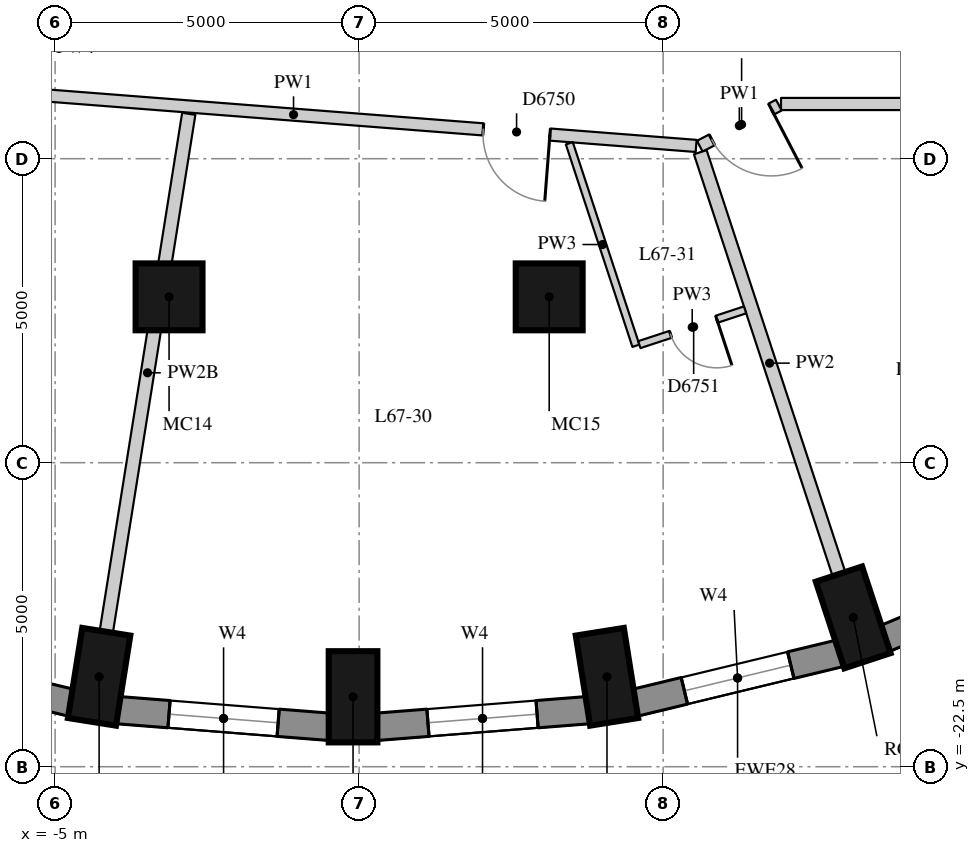
"""IFC4 building model, lengths in metres.
Left out: names, types, materials, properties, quantities, classifications, styles, units other than length and angle.
Written with IfcOpenShell. Run it as: python <this file> out.ifc"""

import sys

from ifc_helpers import new_model, si_unit, direction, frame, frame_2d, origin, origin_2d, place, context, subcontext, project, spatial, rectangle, extrude, element, fill, save


model = new_model("IFC4")
c1 = context("Model", 3, precision=1e-05, world=origin(), true_north=direction((0.0, 1.0)))
c2 = subcontext(c1, "Body", "Model", "MODEL_VIEW")
j1 = project(units=[si_unit("LENGTHUNIT", "METRE"), si_unit("PLANEANGLEUNIT", "RADIAN")], contexts=[c1])
p1 = place(None, origin())
s1 = spatial("IfcSite", under=j1, at=p1, CompositionType="ELEMENT")
p2 = place(p1, origin())
s2 = spatial("IfcBuilding", under=s1, at=p2, CompositionType="ELEMENT")
p3 = place(p2, frame((0.0, 0.0, 236.6)))
s3 = spatial("IfcBuildingStorey", under=s2, at=p3, CompositionType="ELEMENT", Elevation=236.6)
for number, where, z_axis, x_axis in (
    (1, (-4.276, -21.021, 0.0), (0.0, 0.0, 1.0), (-0.157, -0.988, 0.0)),
    (2, (-0.1, -21.35, 0.0), (0.0, 0.0, 1.0), (0.0, -1.0, 0.0)),
    (3, (4.076, -21.021, 0.0), (0.0, 0.0, 1.0), (0.157, -0.988, 0.0)),
    (4, (8.125, -20.044, 0.0), (0.0, 0.0, 1.0), (0.312, -0.95, 0.0)),
):
    element("IfcColumn", number, at=place(p3, frame(where, z_axis=z_axis, x_axis=x_axis)), inside=s3, PredefinedType="COLUMN", context=c2, shape_type="SweptSolid", body=[
        extrude(rectangle(XDim=1.5, YDim=0.8, at=origin_2d()), origin(), (0.0, 0.0, 1.0), 3.3),
    ])
for number, where, z_axis, x_axis in (
    (5, (-3.126, -14.772, 0.0), (0.0, 0.0, 1.0), (1.0, 0.0, 0.0)),
    (6, (3.126, -14.772, 0.0), (0.0, 0.0, 1.0), (1.0, 0.0, 0.0)),
):
    element("IfcColumn", number, at=place(p3, frame(where, z_axis=z_axis, x_axis=x_axis)), inside=s3, PredefinedType="COLUMN", context=c2, shape_type="SweptSolid", body=[
        extrude(rectangle(XDim=1.1, YDim=1.1, at=origin_2d()), origin(), (0.0, 0.0, 1.0), 3.3),
    ])
p4 = place(p3, frame((-8.119, -20.632, 0.0), z_axis=(0.0, 0.0, 1.0), x_axis=(0.972115243017, -0.234503633859, 0.0)))
e7 = element("IfcWall", 7, at=p4, inside=s3, PredefinedType="SOLIDWALL", context=c2, shape_type="SweptSolid", body=[
    extrude(rectangle(XDim=3.487, YDim=0.45, at=frame_2d((1.743, 0.0))), origin(), (0.0, 0.0, 1.0), 3.02),
])
p5 = place(p4, frame((0.843, 0.0, 0.4)))
e8 = element("IfcOpeningElement", 8, at=p5, cuts=e7, PredefinedType="OPENING", context=c2, shape_type="SweptSolid", body=[
    extrude(rectangle(XDim=1.8, YDim=1.75, at=frame_2d((0.9, 0.875))), frame((0.0, 0.235, 0.0), z_axis=(0.0, -1.0, 0.0), x_axis=(1.0, 0.0, 0.0)), (0.0, 0.0, 1.0), 0.47),
])
p6 = place(p3, frame((-3.979, -21.569, 0.0), z_axis=(0.0, 0.0, 1.0), x_axis=(0.996910775835, -0.078542377245, 0.0)))
e9 = element("IfcWall", 9, at=p6, inside=s3, PredefinedType="SOLIDWALL", context=c2, shape_type="SweptSolid", body=[
    extrude(rectangle(XDim=3.509, YDim=0.45, at=frame_2d((1.755, 0.0))), origin(), (0.0, 0.0, 1.0), 3.02),
])
p7 = place(p6, frame((0.855, 0.0, 0.4)))
e10 = element("IfcOpeningElement", 10, at=p7, cuts=e9, PredefinedType="OPENING", context=c2, shape_type="SweptSolid", body=[
    extrude(rectangle(XDim=1.8, YDim=1.75, at=frame_2d((0.9, 0.875))), frame((0.0, 0.235, 0.0), z_axis=(0.0, -1.0, 0.0), x_axis=(1.0, 0.0, 0.0)), (0.0, 0.0, 1.0), 0.47),
])
p8 = place(p3, frame((0.28, -21.844, 0.0), z_axis=(0.0, 0.0, 1.0), x_axis=(0.996910775835, 0.078542377245, 0.0)))
e11 = element("IfcWall", 11, at=p8, inside=s3, PredefinedType="SOLIDWALL", context=c2, shape_type="SweptSolid", body=[
    extrude(rectangle(XDim=3.509, YDim=0.45, at=frame_2d((1.755, 0.0))), origin(), (0.0, 0.0, 1.0), 3.02),
])
p9 = place(p8, frame((0.855, 0.0, 0.4)))
e12 = element("IfcOpeningElement", 12, at=p9, cuts=e11, PredefinedType="OPENING", context=c2, shape_type="SweptSolid", body=[
    extrude(rectangle(XDim=1.8, YDim=1.75, at=frame_2d((0.9, 0.875))), frame((0.0, 0.235, 0.0), z_axis=(0.0, -1.0, 0.0), x_axis=(1.0, 0.0, 0.0)), (0.0, 0.0, 1.0), 0.47),
])
p10 = place(p3, frame((4.529, -21.449, 0.0), z_axis=(0.0, 0.0, 1.0), x_axis=(0.972115243017, 0.234503633859, 0.0)))
e13 = element("IfcWall", 13, at=p10, inside=s3, PredefinedType="SOLIDWALL", context=c2, shape_type="SweptSolid", body=[
    extrude(rectangle(XDim=3.487, YDim=0.45, at=frame_2d((1.743, 0.0))), origin(), (0.0, 0.0, 1.0), 3.02),
])
p11 = place(p10, frame((0.843, 0.0, 0.4)))
e14 = element("IfcOpeningElement", 14, at=p11, cuts=e13, PredefinedType="OPENING", context=c2, shape_type="SweptSolid", body=[
    extrude(rectangle(XDim=1.8, YDim=1.75, at=frame_2d((0.9, 0.875))), frame((0.0, 0.235, 0.0), z_axis=(0.0, -1.0, 0.0), x_axis=(1.0, 0.0, 0.0)), (0.0, 0.0, 1.0), 0.47),
])
p12 = place(p3, frame((8.641, -20.395, 0.0), z_axis=(0.0, 0.0, 1.0), x_axis=(0.922049934692, 0.3870709469, 0.0)))
e15 = element("IfcWall", 15, at=p12, inside=s3, PredefinedType="SOLIDWALL", context=c2, shape_type="SweptSolid", body=[
    extrude(rectangle(XDim=3.443, YDim=0.45, at=frame_2d((1.722, 0.0))), origin(), (0.0, 0.0, 1.0), 3.02),
])
p13 = place(p12, frame((0.822, 0.0, 0.4)))
e16 = element("IfcOpeningElement", 16, at=p13, cuts=e15, PredefinedType="OPENING", context=c2, shape_type="SweptSolid", body=[
    extrude(rectangle(XDim=1.8, YDim=1.75, at=frame_2d((0.9, 0.875))), frame((0.0, 0.235, 0.0), z_axis=(0.0, -1.0, 0.0), x_axis=(1.0, 0.0, 0.0)), (0.0, 0.0, 1.0), 0.47),
])
p14 = place(p3, frame((17.5, -11.6, 0.0), z_axis=(0.0, 0.0, 1.0), x_axis=(-1.0, 0.0, 0.0)))
e17 = element("IfcWall", 17, at=p14, inside=s3, PredefinedType="PARTITIONING", context=c2, shape_type="SweptSolid", body=[
    extrude(rectangle(XDim=10.562, YDim=0.2, at=frame_2d((5.281, 0.0))), origin(), (0.0, 0.0, 1.0), 3.02),
])
p15 = place(p3, frame((6.903, -11.619, 0.0), z_axis=(0.0, 0.0, 1.0), x_axis=(-0.887353179844, -0.461090375329, 0.0)))
e18 = element("IfcWall", 18, at=p15, inside=s3, PredefinedType="PARTITIONING", context=c2, shape_type="SweptSolid", body=[
    extrude(rectangle(XDim=1.465, YDim=0.2, at=frame_2d((0.732, 0.0))), origin(), (0.0, 0.0, 1.0), 3.02),
])
p16 = place(p15, frame((0.14, 0.0, 0.0)))
e19 = element("IfcOpeningElement", 19, at=p16, cuts=e18, PredefinedType="OPENING", context=c2, shape_type="SweptSolid", body=[
    extrude(rectangle(XDim=1.1, YDim=2.1, at=frame_2d((0.55, 1.05))), frame((0.0, 0.11, 0.0), z_axis=(0.0, -1.0, 0.0), x_axis=(1.0, 0.0, 0.0)), (0.0, 0.0, 1.0), 0.22),
])
p17 = place(p3, frame((5.542, -12.29, 0.0), z_axis=(0.0, 0.0, 1.0), x_axis=(-0.996994281558, 0.077475173702, 0.0)))
e20 = element("IfcWall", 20, at=p17, inside=s3, PredefinedType="PARTITIONING", context=c2, shape_type="SweptSolid", body=[
    extrude(rectangle(XDim=13.282, YDim=0.2, at=frame_2d((6.641, 0.0))), origin(), (0.0, 0.0, 1.0), 3.02),
])
p18 = place(p17, frame((2.412, 0.0, 0.0)))
e21 = element("IfcOpeningElement", 21, at=p18, cuts=e20, PredefinedType="OPENING", context=c2, shape_type="SweptSolid", body=[
    extrude(rectangle(XDim=1.1, YDim=2.1, at=frame_2d((0.55, 1.05))), frame((0.0, 0.11, 0.0), z_axis=(0.0, -1.0, 0.0), x_axis=(1.0, 0.0, 0.0)), (0.0, 0.0, 1.0), 0.22),
])
p19 = place(p3, frame((-4.158, -20.281, 0.0), z_axis=(0.0, 0.0, 1.0), x_axis=(0.157248675007, 0.987559038341, 0.0)))
e22 = element("IfcWall", 22, at=p19, inside=s3, PredefinedType="PARTITIONING", context=c2, shape_type="SweptSolid", body=[
    extrude(rectangle(XDim=8.626, YDim=0.22, at=frame_2d((4.313, 0.0))), origin(), (0.0, 0.0, 1.0), 2.57),
])
p20 = place(p3, frame((7.891, -19.332, 0.0), z_axis=(0.0, 0.0, 1.0), x_axis=(-0.312264049527, 0.949995349132, 0.0)))
e23 = element("IfcWall", 23, at=p20, inside=s3, PredefinedType="PARTITIONING", context=c2, shape_type="SweptSolid", body=[
    extrude(rectangle(XDim=7.304, YDim=0.22, at=frame_2d((3.652, 0.0))), origin(), (0.0, 0.0, 1.0), 3.02),
])
p21 = place(p3, frame((3.457, -12.246, 0.0), z_axis=(0.0, 0.0, 1.0), x_axis=(0.312255646562, -0.949998111151, 0.0)))
e24 = element("IfcWall", 24, at=p21, inside=s3, PredefinedType="PARTITIONING", context=c2, shape_type="SweptSolid", body=[
    extrude(rectangle(XDim=3.506, YDim=0.12, at=frame_2d((1.753, 0.0))), origin(), (0.0, 0.0, 1.0), 3.02),
])
p22 = place(p3, frame((4.608, -15.558, 0.0), z_axis=(0.0, 0.0, 1.0), x_axis=(0.949995576072, 0.312263359111, 0.0)))
e25 = element("IfcWall", 25, at=p22, inside=s3, PredefinedType="PARTITIONING", context=c2, shape_type="SweptSolid", body=[
    extrude(rectangle(XDim=1.83, YDim=0.12, at=frame_2d((0.915, 0.0))), origin(), (0.0, 0.0, 1.0), 3.02),
])
p23 = place(p22, frame((0.54, 0.0, 0.0)))
e26 = element("IfcOpeningElement", 26, at=p23, cuts=e25, PredefinedType="OPENING", context=c2, shape_type="SweptSolid", body=[
    extrude(rectangle(XDim=0.8, YDim=2.1, at=frame_2d((0.4, 1.05))), frame((0.0, 0.07, 0.0), z_axis=(0.0, -1.0, 0.0), x_axis=(1.0, 0.0, 0.0)), (0.0, 0.0, 1.0), 0.14),
])
p24 = place(p7, origin())
e27 = element("IfcWindow", 27, at=p24, inside=s3, PartitioningType="SINGLE_PANEL", PredefinedType="WINDOW", context=c2, shape_type="SweptSolid", body=[
    extrude(rectangle(XDim=1.8, YDim=1.75, at=frame_2d((0.9, 0.875))), frame((0.0, 0.035, 0.0), z_axis=(0.0, -1.0, 0.0), x_axis=(1.0, 0.0, 0.0)), (0.0, 0.0, 1.0), 0.06),
])
fill(e10, e27)
p25 = place(p9, origin())
e28 = element("IfcWindow", 28, at=p25, inside=s3, PartitioningType="SINGLE_PANEL", PredefinedType="WINDOW", context=c2, shape_type="SweptSolid", body=[
    extrude(rectangle(XDim=1.8, YDim=1.75, at=frame_2d((0.9, 0.875))), frame((0.0, 0.035, 0.0), z_axis=(0.0, -1.0, 0.0), x_axis=(1.0, 0.0, 0.0)), (0.0, 0.0, 1.0), 0.06),
])
fill(e12, e28)
p26 = place(p11, origin())
e29 = element("IfcWindow", 29, at=p26, inside=s3, PartitioningType="SINGLE_PANEL", PredefinedType="WINDOW", context=c2, shape_type="SweptSolid", body=[
    extrude(rectangle(XDim=1.8, YDim=1.75, at=frame_2d((0.9, 0.875))), frame((0.0, 0.035, 0.0), z_axis=(0.0, -1.0, 0.0), x_axis=(1.0, 0.0, 0.0)), (0.0, 0.0, 1.0), 0.06),
])
fill(e14, e29)
p27 = place(p18, origin())
e30 = element("IfcDoor", 30, at=p27, inside=s3, OperationType="SINGLE_SWING_LEFT", PredefinedType="DOOR", context=c2, shape_type="SweptSolid", body=[
    extrude(rectangle(XDim=1.1, YDim=2.1, at=frame_2d((0.55, 1.05))), frame((0.0, 0.025, 0.0), z_axis=(0.0, -1.0, 0.0), x_axis=(1.0, 0.0, 0.0)), (0.0, 0.0, 1.0), 0.05),
])
fill(e21, e30)
p28 = place(p23, origin())
e31 = element("IfcDoor", 31, at=p28, inside=s3, OperationType="SINGLE_SWING_LEFT", PredefinedType="DOOR", context=c2, shape_type="SweptSolid", body=[
    extrude(rectangle(XDim=0.8, YDim=2.1, at=frame_2d((0.4, 1.05))), frame((0.0, 0.025, 0.0), z_axis=(0.0, -1.0, 0.0), x_axis=(1.0, 0.0, 0.0)), (0.0, 0.0, 1.0), 0.05),
])
fill(e26, e31)
p29 = place(p16, origin())
e32 = element("IfcDoor", 32, at=p29, inside=s3, OperationType="SINGLE_SWING_LEFT", PredefinedType="DOOR", context=c2, shape_type="SweptSolid", body=[
    extrude(rectangle(XDim=1.1, YDim=2.1, at=frame_2d((0.55, 1.05))), frame((0.0, 0.025, 0.0), z_axis=(0.0, -1.0, 0.0), x_axis=(1.0, 0.0, 0.0)), (0.0, 0.0, 1.0), 0.05),
])
fill(e19, e32)
save(model, sys.argv[1])
